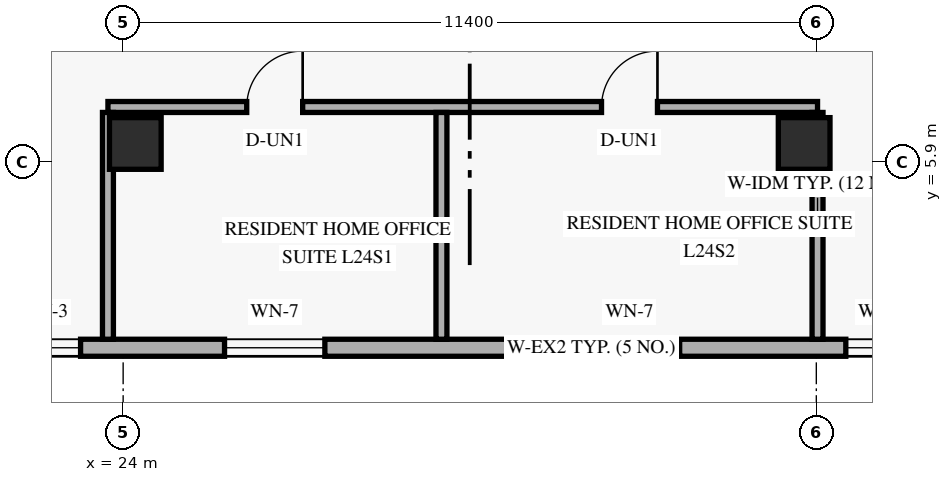
"""IFC4 building model, lengths in metres.
Left out: names, types, materials, properties, quantities, classifications, styles, units other than length and angle.
Written with IfcOpenShell. Run it as: python <this file> out.ifc"""

import sys

from ifc_helpers import new_model, si_unit, direction, frame, frame_2d, origin, origin_2d, place, context, subcontext, project, spatial, rectangle, extrude, element, fill, save


model = new_model("IFC4")
c1 = context("Model", 3, precision=1e-05, world=origin(), true_north=direction((0.0, 1.0)))
c2 = subcontext(c1, "Body", "Model", "MODEL_VIEW")
j1 = project(units=[si_unit("LENGTHUNIT", "METRE"), si_unit("PLANEANGLEUNIT", "RADIAN")], contexts=[c1])
p1 = place(None, origin())
s1 = spatial("IfcSite", under=j1, at=p1, CompositionType="ELEMENT")
p2 = place(p1, origin())
s2 = spatial("IfcBuilding", under=s1, at=p2, CompositionType="ELEMENT")
p3 = place(p2, frame((0.0, 0.0, 94.8)))
s3 = spatial("IfcBuildingStorey", under=s2, at=p3, CompositionType="ELEMENT", Elevation=94.8)
for number, where, z_axis, x_axis in (
    (1, (24.2, 6.2, 0.0), (0.0, 0.0, 1.0), (1.0, 0.0, 0.0)),
    (2, (35.2, 6.2, 0.0), (0.0, 0.0, 1.0), (1.0, 0.0, 0.0)),
):
    element("IfcColumn", number, at=place(p3, frame(where, z_axis=z_axis, x_axis=x_axis)), inside=s3, PredefinedType="COLUMN", context=c2, shape_type="SweptSolid", body=[
        extrude(rectangle(XDim=0.85, YDim=0.85, at=origin_2d()), origin(), (0.0, 0.0, 1.0), 3.6),
    ])
p4 = place(p3, frame((13.42, 2.84, 0.0), z_axis=(0.0, 0.0, 1.0), x_axis=(1.0, 0.0, 0.0)))
e3 = element("IfcWall", 3, at=p4, inside=s3, PredefinedType="SOLIDWALL", context=c2, shape_type="SweptSolid", body=[
    extrude(rectangle(XDim=36.56, YDim=0.28, at=frame_2d((18.28, 0.0))), origin(), (0.0, 0.0, 1.0), 3.35),
])
p5 = place(p4, frame((3.29, 0.0, 0.85)))
e4 = element("IfcOpeningElement", 4, at=p5, cuts=e3, PredefinedType="OPENING", context=c2, shape_type="SweptSolid", body=[
    extrude(rectangle(XDim=1.65, YDim=1.6, at=frame_2d((0.825, 0.8))), frame((0.0, 0.15, 0.0), z_axis=(0.0, -1.0, 0.0), x_axis=(1.0, 0.0, 0.0)), (0.0, 0.0, 1.0), 0.3),
])
p6 = place(p4, frame((8.68, 0.0, 0.85)))
e5 = element("IfcOpeningElement", 5, at=p6, cuts=e3, PredefinedType="OPENING", context=c2, shape_type="SweptSolid", body=[
    extrude(rectangle(XDim=1.2, YDim=1.5, at=frame_2d((0.6, 0.75))), frame((0.0, 0.15, 0.0), z_axis=(0.0, -1.0, 0.0), x_axis=(1.0, 0.0, 0.0)), (0.0, 0.0, 1.0), 0.3),
])
p7 = place(p4, frame((12.248, 0.0, 0.85)))
e6 = element("IfcOpeningElement", 6, at=p7, cuts=e3, PredefinedType="OPENING", context=c2, shape_type="SweptSolid", body=[
    extrude(rectangle(XDim=1.65, YDim=1.6, at=frame_2d((0.825, 0.8))), frame((0.0, 0.15, 0.0), z_axis=(0.0, -1.0, 0.0), x_axis=(1.0, 0.0, 0.0)), (0.0, 0.0, 1.0), 0.3),
])
p8 = place(p4, frame((18.083, 0.0, 0.85)))
e7 = element("IfcOpeningElement", 7, at=p8, cuts=e3, PredefinedType="OPENING", context=c2, shape_type="SweptSolid", body=[
    extrude(rectangle(XDim=1.65, YDim=1.6, at=frame_2d((0.825, 0.8))), frame((0.0, 0.15, 0.0), z_axis=(0.0, -1.0, 0.0), x_axis=(1.0, 0.0, 0.0)), (0.0, 0.0, 1.0), 0.3),
])
p9 = place(p4, frame((22.465, 0.0, 0.85)))
e8 = element("IfcOpeningElement", 8, at=p9, cuts=e3, PredefinedType="OPENING", context=c2, shape_type="SweptSolid", body=[
    extrude(rectangle(XDim=1.2, YDim=1.5, at=frame_2d((0.6, 0.75))), frame((0.0, 0.15, 0.0), z_axis=(0.0, -1.0, 0.0), x_axis=(1.0, 0.0, 0.0)), (0.0, 0.0, 1.0), 0.3),
])
p10 = place(p4, frame((29.52, 0.0, 0.85)))
e9 = element("IfcOpeningElement", 9, at=p10, cuts=e3, PredefinedType="OPENING", context=c2, shape_type="SweptSolid", body=[
    extrude(rectangle(XDim=1.65, YDim=1.6, at=frame_2d((0.825, 0.8))), frame((0.0, 0.15, 0.0), z_axis=(0.0, -1.0, 0.0), x_axis=(1.0, 0.0, 0.0)), (0.0, 0.0, 1.0), 0.3),
])
p11 = place(p3, frame((23.75, 6.8, 0.0), z_axis=(0.0, 0.0, 1.0), x_axis=(1.0, 0.0, 0.0)))
e10 = element("IfcWall", 10, at=p11, inside=s3, PredefinedType="STANDARD", context=c2, shape_type="SweptSolid", body=[
    extrude(rectangle(XDim=11.67, YDim=0.18, at=frame_2d((5.835, 0.0))), origin(), (0.0, 0.0, 1.0), 2.721),
])
p12 = place(p11, frame((2.282, 0.0, 0.0)))
e11 = element("IfcOpeningElement", 11, at=p12, cuts=e10, PredefinedType="OPENING", context=c2, shape_type="SweptSolid", body=[
    extrude(rectangle(XDim=0.92, YDim=2.15, at=frame_2d((0.46, 1.075))), frame((0.0, 0.1, 0.0), z_axis=(0.0, -1.0, 0.0), x_axis=(1.0, 0.0, 0.0)), (0.0, 0.0, 1.0), 0.2),
])
p13 = place(p11, frame((8.117, 0.0, 0.0)))
e12 = element("IfcOpeningElement", 12, at=p13, cuts=e10, PredefinedType="OPENING", context=c2, shape_type="SweptSolid", body=[
    extrude(rectangle(XDim=0.92, YDim=2.15, at=frame_2d((0.46, 1.075))), frame((0.0, 0.1, 0.0), z_axis=(0.0, -1.0, 0.0), x_axis=(1.0, 0.0, 0.0)), (0.0, 0.0, 1.0), 0.2),
])
p14 = place(p3, frame((35.42, 2.98, 0.0), z_axis=(0.0, 0.0, 1.0), x_axis=(0.0, 1.0, 0.0)))
e13 = element("IfcWall", 13, at=p14, inside=s3, PredefinedType="PARTITIONING", context=c2, shape_type="SweptSolid", body=[
    extrude(rectangle(XDim=3.73, YDim=0.18, at=frame_2d((1.865, 0.0))), origin(), (0.0, 0.0, 1.0), 2.721),
])
for number, where, z_axis, x_axis in (
    (14, (23.75, 2.98, 0.0), (0.0, 0.0, 1.0), (0.0, 1.0, 0.0)),
    (15, (29.235, 2.98, 0.0), (0.0, 0.0, 1.0), (0.0, 1.0, 0.0)),
):
    element("IfcWall", number, at=place(p3, frame(where, z_axis=z_axis, x_axis=x_axis)), inside=s3, PredefinedType="PARTITIONING", context=c2, shape_type="SweptSolid", body=[
        extrude(rectangle(XDim=3.73, YDim=0.18, at=frame_2d((1.865, 0.0))), origin(), (0.0, 0.0, 1.0), 2.799),
    ])
p15 = place(p6, origin())
e16 = element("IfcWindow", 16, at=p15, inside=s3, PartitioningType="SINGLE_PANEL", PredefinedType="WINDOW", context=c2, shape_type="SweptSolid", body=[
    extrude(rectangle(XDim=1.2, YDim=1.5, at=frame_2d((0.6, 0.75))), frame((0.0, 0.03, 0.0), z_axis=(0.0, -1.0, 0.0), x_axis=(1.0, 0.0, 0.0)), (0.0, 0.0, 1.0), 0.06),
])
fill(e5, e16)
p16 = place(p7, origin())
e17 = element("IfcWindow", 17, at=p16, inside=s3, PartitioningType="SINGLE_PANEL", PredefinedType="WINDOW", context=c2, shape_type="SweptSolid", body=[
    extrude(rectangle(XDim=1.65, YDim=1.6, at=frame_2d((0.825, 0.8))), frame((0.0, 0.03, 0.0), z_axis=(0.0, -1.0, 0.0), x_axis=(1.0, 0.0, 0.0)), (0.0, 0.0, 1.0), 0.06),
])
fill(e6, e17)
p17 = place(p8, origin())
e18 = element("IfcWindow", 18, at=p17, inside=s3, PartitioningType="SINGLE_PANEL", PredefinedType="WINDOW", context=c2, shape_type="SweptSolid", body=[
    extrude(rectangle(XDim=1.65, YDim=1.6, at=frame_2d((0.825, 0.8))), frame((0.0, 0.03, 0.0), z_axis=(0.0, -1.0, 0.0), x_axis=(1.0, 0.0, 0.0)), (0.0, 0.0, 1.0), 0.06),
])
fill(e7, e18)
p18 = place(p9, origin())
e19 = element("IfcWindow", 19, at=p18, inside=s3, PartitioningType="SINGLE_PANEL", PredefinedType="WINDOW", context=c2, shape_type="SweptSolid", body=[
    extrude(rectangle(XDim=1.2, YDim=1.5, at=frame_2d((0.6, 0.75))), frame((0.0, 0.03, 0.0), z_axis=(0.0, -1.0, 0.0), x_axis=(1.0, 0.0, 0.0)), (0.0, 0.0, 1.0), 0.06),
])
fill(e8, e19)
p19 = place(p12, origin())
e20 = element("IfcDoor", 20, at=p19, inside=s3, OperationType="SINGLE_SWING_RIGHT", PredefinedType="DOOR", context=c2, shape_type="SweptSolid", body=[
    extrude(rectangle(XDim=0.92, YDim=2.15, at=frame_2d((0.46, 1.075))), frame((0.0, 0.025, 0.0), z_axis=(0.0, -1.0, 0.0), x_axis=(1.0, 0.0, 0.0)), (0.0, 0.0, 1.0), 0.05),
])
fill(e11, e20)
p20 = place(p13, origin())
e21 = element("IfcDoor", 21, at=p20, inside=s3, OperationType="SINGLE_SWING_RIGHT", PredefinedType="DOOR", context=c2, shape_type="SweptSolid", body=[
    extrude(rectangle(XDim=0.92, YDim=2.15, at=frame_2d((0.46, 1.075))), frame((0.0, 0.025, 0.0), z_axis=(0.0, -1.0, 0.0), x_axis=(1.0, 0.0, 0.0)), (0.0, 0.0, 1.0), 0.05),
])
fill(e12, e21)
save(model, sys.argv[1])
